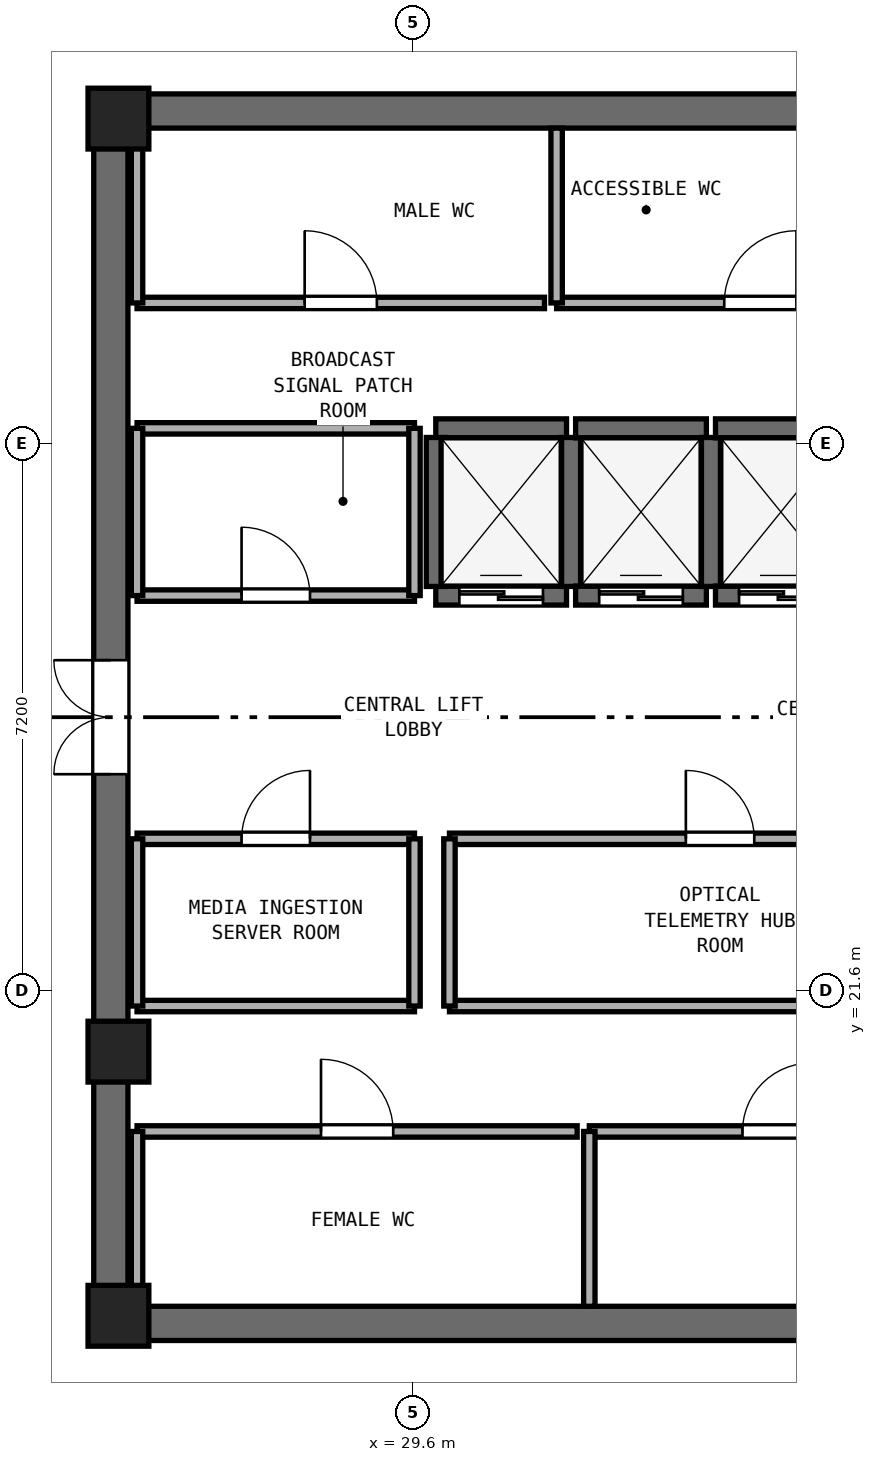
"""IFC4 building model, lengths in metres.
Left out: names, types, materials, properties, quantities, classifications, styles, units other than length and angle.
Written with IfcOpenShell. Run it as: python <this file> out.ifc"""

import sys

from ifc_helpers import new_model, si_unit, direction, frame, frame_2d, origin, origin_2d, place, context, subcontext, project, spatial, rectangle, extrude, element, fill, save


model = new_model("IFC4")
c1 = context("Model", 3, precision=1e-05, world=origin(), true_north=direction((0.0, 1.0)))
c2 = subcontext(c1, "Body", "Model", "MODEL_VIEW")
j1 = project(units=[si_unit("LENGTHUNIT", "METRE"), si_unit("PLANEANGLEUNIT", "RADIAN")], contexts=[c1])
p1 = place(None, origin())
s1 = spatial("IfcSite", under=j1, at=p1, CompositionType="ELEMENT")
p2 = place(p1, origin())
s2 = spatial("IfcBuilding", under=s1, at=p2, CompositionType="ELEMENT")
p3 = place(p2, frame((0.0, 0.0, 274.4)))
s3 = spatial("IfcBuildingStorey", under=s2, at=p3, CompositionType="ELEMENT", Elevation=274.4)
for number, where, z_axis, x_axis in (
    (1, (25.4, 17.225, 0.0), (0.0, 0.0, 1.0), (1.0, 0.0, 0.0)),
    (2, (25.4, 33.175, 0.0), (0.0, 0.0, 1.0), (1.0, 0.0, 0.0)),
):
    element("IfcWall", number, at=place(p3, frame(where, z_axis=z_axis, x_axis=x_axis)), inside=s3, PredefinedType="SHEAR", context=c2, shape_type="SweptSolid", body=[
        extrude(rectangle(XDim=23.2, YDim=0.45, at=frame_2d((11.6, 0.0))), origin(), (0.0, 0.0, 1.0), 3.54),
    ])
p4 = place(p3, frame((25.625, 17.45, 0.0), z_axis=(0.0, 0.0, 1.0), x_axis=(0.0, 1.0, 0.0)))
e3 = element("IfcWall", 3, at=p4, inside=s3, PredefinedType="SHEAR", context=c2, shape_type="SweptSolid", body=[
    extrude(rectangle(XDim=15.5, YDim=0.45, at=frame_2d((7.75, 0.0))), origin(), (0.0, 0.0, 1.0), 3.54),
])
p5 = place(p4, frame((7.0, 0.0, 0.0)))
e4 = element("IfcOpeningElement", 4, at=p5, cuts=e3, PredefinedType="OPENING", context=c2, shape_type="SweptSolid", body=[
    extrude(rectangle(XDim=1.5, YDim=2.15, at=frame_2d((0.75, 1.075))), frame((0.0, 0.235, 0.0), z_axis=(0.0, -1.0, 0.0), x_axis=(1.0, 0.0, 0.0)), (0.0, 0.0, 1.0), 0.47),
])
for number, where, z_axis, x_axis in (
    (5, (25.725, 17.325, 0.0), (0.0, 0.0, 1.0), (1.0, 0.0, 0.0)),
    (6, (25.725, 33.075, 0.0), (0.0, 0.0, 1.0), (1.0, 0.0, 0.0)),
    (7, (25.725, 20.8, 0.0), (0.0, 0.0, 1.0), (1.0, 0.0, 0.0)),
):
    element("IfcColumn", number, at=place(p3, frame(where, z_axis=z_axis, x_axis=x_axis)), inside=s3, PredefinedType="PILASTER", context=c2, shape_type="SweptSolid", body=[
        extrude(rectangle(XDim=0.8, YDim=0.8, at=origin_2d()), origin(), (0.0, 0.0, 1.0), 3.8),
    ])
p6 = place(p3, frame((29.9, 26.8, 0.0), z_axis=(0.0, 0.0, 1.0), x_axis=(1.0, 0.0, 0.0)))
e8 = element("IfcWall", 8, at=p6, inside=s3, PredefinedType="SHEAR", context=c2, shape_type="SweptSolid", body=[
    extrude(rectangle(XDim=1.72, YDim=0.25, at=frame_2d((0.86, 0.0))), origin(), (0.0, 0.0, 1.0), 3.54),
])
p7 = place(p6, frame((0.31, 0.0, 0.0)))
e9 = element("IfcOpeningElement", 9, at=p7, cuts=e8, PredefinedType="OPENING", context=c2, shape_type="SweptSolid", body=[
    extrude(rectangle(XDim=1.1, YDim=2.15, at=frame_2d((0.55, 1.075))), frame((0.0, 0.135, 0.0), z_axis=(0.0, -1.0, 0.0), x_axis=(1.0, 0.0, 0.0)), (0.0, 0.0, 1.0), 0.27),
])
p8 = place(p3, frame((29.9, 29.0, 0.0), z_axis=(0.0, 0.0, 1.0), x_axis=(1.0, 0.0, 0.0)))
e10 = element("IfcWall", 10, at=p8, inside=s3, PredefinedType="SHEAR", context=c2, shape_type="SweptSolid", body=[
    extrude(rectangle(XDim=1.72, YDim=0.25, at=frame_2d((0.86, 0.0))), origin(), (0.0, 0.0, 1.0), 3.54),
])
for number, where, z_axis, x_axis in (
    (11, (29.9, 26.92, 0.0), (0.0, 0.0, 1.0), (0.0, 1.0, 0.0)),
    (12, (31.68, 26.92, 0.0), (0.0, 0.0, 1.0), (0.0, 1.0, 0.0)),
):
    element("IfcWall", number, at=place(p3, frame(where, z_axis=z_axis, x_axis=x_axis)), inside=s3, PredefinedType="SHEAR", context=c2, shape_type="SweptSolid", body=[
        extrude(rectangle(XDim=1.96, YDim=0.25, at=frame_2d((0.98, 0.0))), origin(), (0.0, 0.0, 1.0), 3.54),
    ])
p9 = place(p3, frame((31.74, 26.8, 0.0), z_axis=(0.0, 0.0, 1.0), x_axis=(1.0, 0.0, 0.0)))
e13 = element("IfcWall", 13, at=p9, inside=s3, PredefinedType="SHEAR", context=c2, shape_type="SweptSolid", body=[
    extrude(rectangle(XDim=1.72, YDim=0.25, at=frame_2d((0.86, 0.0))), origin(), (0.0, 0.0, 1.0), 3.54),
])
p10 = place(p9, frame((0.31, 0.0, 0.0)))
e14 = element("IfcOpeningElement", 14, at=p10, cuts=e13, PredefinedType="OPENING", context=c2, shape_type="SweptSolid", body=[
    extrude(rectangle(XDim=1.1, YDim=2.15, at=frame_2d((0.55, 1.075))), frame((0.0, 0.135, 0.0), z_axis=(0.0, -1.0, 0.0), x_axis=(1.0, 0.0, 0.0)), (0.0, 0.0, 1.0), 0.27),
])
p11 = place(p3, frame((31.74, 29.0, 0.0), z_axis=(0.0, 0.0, 1.0), x_axis=(1.0, 0.0, 0.0)))
e15 = element("IfcWall", 15, at=p11, inside=s3, PredefinedType="SHEAR", context=c2, shape_type="SweptSolid", body=[
    extrude(rectangle(XDim=1.72, YDim=0.25, at=frame_2d((0.86, 0.0))), origin(), (0.0, 0.0, 1.0), 3.54),
])
p12 = place(p3, frame((33.52, 26.92, 0.0), z_axis=(0.0, 0.0, 1.0), x_axis=(0.0, 1.0, 0.0)))
e16 = element("IfcWall", 16, at=p12, inside=s3, PredefinedType="SHEAR", context=c2, shape_type="SweptSolid", body=[
    extrude(rectangle(XDim=1.96, YDim=0.25, at=frame_2d((0.98, 0.0))), origin(), (0.0, 0.0, 1.0), 3.54),
])
p13 = place(p3, frame((33.58, 26.8, 0.0), z_axis=(0.0, 0.0, 1.0), x_axis=(1.0, 0.0, 0.0)))
e17 = element("IfcWall", 17, at=p13, inside=s3, PredefinedType="SHEAR", context=c2, shape_type="SweptSolid", body=[
    extrude(rectangle(XDim=1.72, YDim=0.25, at=frame_2d((0.86, 0.0))), origin(), (0.0, 0.0, 1.0), 3.54),
])
p14 = place(p13, frame((0.31, 0.0, 0.0)))
e18 = element("IfcOpeningElement", 18, at=p14, cuts=e17, PredefinedType="OPENING", context=c2, shape_type="SweptSolid", body=[
    extrude(rectangle(XDim=1.1, YDim=2.15, at=frame_2d((0.55, 1.075))), frame((0.0, 0.135, 0.0), z_axis=(0.0, -1.0, 0.0), x_axis=(1.0, 0.0, 0.0)), (0.0, 0.0, 1.0), 0.27),
])
p15 = place(p3, frame((33.58, 29.0, 0.0), z_axis=(0.0, 0.0, 1.0), x_axis=(1.0, 0.0, 0.0)))
e19 = element("IfcWall", 19, at=p15, inside=s3, PredefinedType="SHEAR", context=c2, shape_type="SweptSolid", body=[
    extrude(rectangle(XDim=1.72, YDim=0.25, at=frame_2d((0.86, 0.0))), origin(), (0.0, 0.0, 1.0), 3.54),
])
p16 = place(p3, frame((25.97, 30.65, 0.0), z_axis=(0.0, 0.0, 1.0), x_axis=(1.0, 0.0, 0.0)))
e20 = element("IfcWall", 20, at=p16, inside=s3, PredefinedType="PARTITIONING", context=c2, shape_type="SweptSolid", body=[
    extrude(rectangle(XDim=5.36, YDim=0.15, at=frame_2d((2.68, 0.0))), origin(), (0.0, 0.0, 1.0), 3.54),
])
p17 = place(p16, frame((2.205, 0.0, 0.0)))
e21 = element("IfcOpeningElement", 21, at=p17, cuts=e20, PredefinedType="OPENING", context=c2, shape_type="SweptSolid", body=[
    extrude(rectangle(XDim=0.95, YDim=2.1, at=frame_2d((0.475, 1.05))), frame((0.0, 0.085, 0.0), z_axis=(0.0, -1.0, 0.0), x_axis=(1.0, 0.0, 0.0)), (0.0, 0.0, 1.0), 0.17),
])
p18 = place(p3, frame((25.97, 30.65, 0.0), z_axis=(0.0, 0.0, 1.0), x_axis=(0.0, 1.0, 0.0)))
e22 = element("IfcWall", 22, at=p18, inside=s3, PredefinedType="PARTITIONING", context=c2, shape_type="SweptSolid", body=[
    extrude(rectangle(XDim=2.3, YDim=0.15, at=frame_2d((1.15, 0.0))), origin(), (0.0, 0.0, 1.0), 2.64),
])
p19 = place(p3, frame((31.49, 30.65, 0.0), z_axis=(0.0, 0.0, 1.0), x_axis=(1.0, 0.0, 0.0)))
e23 = element("IfcWall", 23, at=p19, inside=s3, PredefinedType="PARTITIONING", context=c2, shape_type="SweptSolid", body=[
    extrude(rectangle(XDim=5.36, YDim=0.15, at=frame_2d((2.68, 0.0))), origin(), (0.0, 0.0, 1.0), 3.54),
])
p20 = place(p19, frame((2.205, 0.0, 0.0)))
e24 = element("IfcOpeningElement", 24, at=p20, cuts=e23, PredefinedType="OPENING", context=c2, shape_type="SweptSolid", body=[
    extrude(rectangle(XDim=0.95, YDim=2.1, at=frame_2d((0.475, 1.05))), frame((0.0, 0.085, 0.0), z_axis=(0.0, -1.0, 0.0), x_axis=(1.0, 0.0, 0.0)), (0.0, 0.0, 1.0), 0.17),
])
p21 = place(p3, frame((31.49, 30.65, 0.0), z_axis=(0.0, 0.0, 1.0), x_axis=(0.0, 1.0, 0.0)))
e25 = element("IfcWall", 25, at=p21, inside=s3, PredefinedType="PARTITIONING", context=c2, shape_type="SweptSolid", body=[
    extrude(rectangle(XDim=2.3, YDim=0.15, at=frame_2d((1.15, 0.0))), origin(), (0.0, 0.0, 1.0), 3.54),
])
p22 = place(p3, frame((25.97, 19.75, 0.0), z_axis=(0.0, 0.0, 1.0), x_axis=(1.0, 0.0, 0.0)))
e26 = element("IfcWall", 26, at=p22, inside=s3, PredefinedType="PARTITIONING", context=c2, shape_type="SweptSolid", body=[
    extrude(rectangle(XDim=5.79, YDim=0.15, at=frame_2d((2.895, 0.0))), origin(), (0.0, 0.0, 1.0), 3.54),
])
p23 = place(p22, frame((2.42, 0.0, 0.0)))
e27 = element("IfcOpeningElement", 27, at=p23, cuts=e26, PredefinedType="OPENING", context=c2, shape_type="SweptSolid", body=[
    extrude(rectangle(XDim=0.95, YDim=2.1, at=frame_2d((0.475, 1.05))), frame((0.0, 0.085, 0.0), z_axis=(0.0, -1.0, 0.0), x_axis=(1.0, 0.0, 0.0)), (0.0, 0.0, 1.0), 0.17),
])
p24 = place(p3, frame((25.97, 17.45, 0.0), z_axis=(0.0, 0.0, 1.0), x_axis=(0.0, 1.0, 0.0)))
e28 = element("IfcWall", 28, at=p24, inside=s3, PredefinedType="PARTITIONING", context=c2, shape_type="SweptSolid", body=[
    extrude(rectangle(XDim=2.3, YDim=0.15, at=frame_2d((1.15, 0.0))), origin(), (0.0, 0.0, 1.0), 2.64),
])
p25 = place(p3, frame((31.92, 19.75, 0.0), z_axis=(0.0, 0.0, 1.0), x_axis=(1.0, 0.0, 0.0)))
e29 = element("IfcWall", 29, at=p25, inside=s3, PredefinedType="PARTITIONING", context=c2, shape_type="SweptSolid", body=[
    extrude(rectangle(XDim=4.93, YDim=0.15, at=frame_2d((2.465, 0.0))), origin(), (0.0, 0.0, 1.0), 3.54),
])
p26 = place(p25, frame((2.015, 0.0, 0.0)))
e30 = element("IfcOpeningElement", 30, at=p26, cuts=e29, PredefinedType="OPENING", context=c2, shape_type="SweptSolid", body=[
    extrude(rectangle(XDim=0.9, YDim=2.1, at=frame_2d((0.45, 1.05))), frame((0.0, 0.085, 0.0), z_axis=(0.0, -1.0, 0.0), x_axis=(1.0, 0.0, 0.0)), (0.0, 0.0, 1.0), 0.17),
])
p27 = place(p3, frame((31.92, 17.45, 0.0), z_axis=(0.0, 0.0, 1.0), x_axis=(0.0, 1.0, 0.0)))
e31 = element("IfcWall", 31, at=p27, inside=s3, PredefinedType="PARTITIONING", context=c2, shape_type="SweptSolid", body=[
    extrude(rectangle(XDim=2.3, YDim=0.15, at=frame_2d((1.15, 0.0))), origin(), (0.0, 0.0, 1.0), 3.54),
])
p28 = place(p3, frame((25.97, 26.8, 0.0), z_axis=(0.0, 0.0, 1.0), x_axis=(1.0, 0.0, 0.0)))
e32 = element("IfcWall", 32, at=p28, inside=s3, PredefinedType="PARTITIONING", context=c2, shape_type="SweptSolid", body=[
    extrude(rectangle(XDim=3.65, YDim=0.15, at=frame_2d((1.825, 0.0))), origin(), (0.0, 0.0, 1.0), 3.54),
])
p29 = place(p28, frame((1.375, 0.0, 0.0)))
e33 = element("IfcOpeningElement", 33, at=p29, cuts=e32, PredefinedType="OPENING", context=c2, shape_type="SweptSolid", body=[
    extrude(rectangle(XDim=0.9, YDim=2.1, at=frame_2d((0.45, 1.05))), frame((0.0, 0.085, 0.0), z_axis=(0.0, -1.0, 0.0), x_axis=(1.0, 0.0, 0.0)), (0.0, 0.0, 1.0), 0.17),
])
p30 = place(p3, frame((25.97, 29.0, 0.0), z_axis=(0.0, 0.0, 1.0), x_axis=(1.0, 0.0, 0.0)))
e34 = element("IfcWall", 34, at=p30, inside=s3, PredefinedType="PARTITIONING", context=c2, shape_type="SweptSolid", body=[
    extrude(rectangle(XDim=3.65, YDim=0.15, at=frame_2d((1.825, 0.0))), origin(), (0.0, 0.0, 1.0), 3.54),
])
p31 = place(p3, frame((25.97, 26.8, 0.0), z_axis=(0.0, 0.0, 1.0), x_axis=(0.0, 1.0, 0.0)))
e35 = element("IfcWall", 35, at=p31, inside=s3, PredefinedType="PARTITIONING", context=c2, shape_type="SweptSolid", body=[
    extrude(rectangle(XDim=2.2, YDim=0.15, at=frame_2d((1.1, 0.0))), origin(), (0.0, 0.0, 1.0), 2.64),
])
p32 = place(p3, frame((29.62, 26.8, 0.0), z_axis=(0.0, 0.0, 1.0), x_axis=(0.0, 1.0, 0.0)))
e36 = element("IfcWall", 36, at=p32, inside=s3, PredefinedType="PARTITIONING", context=c2, shape_type="SweptSolid", body=[
    extrude(rectangle(XDim=2.2, YDim=0.15, at=frame_2d((1.1, 0.0))), origin(), (0.0, 0.0, 1.0), 3.54),
])
p33 = place(p3, frame((25.97, 21.4, 0.0), z_axis=(0.0, 0.0, 1.0), x_axis=(1.0, 0.0, 0.0)))
e37 = element("IfcWall", 37, at=p33, inside=s3, PredefinedType="PARTITIONING", context=c2, shape_type="SweptSolid", body=[
    extrude(rectangle(XDim=3.65, YDim=0.15, at=frame_2d((1.825, 0.0))), origin(), (0.0, 0.0, 1.0), 3.54),
])
p34 = place(p3, frame((25.97, 23.6, 0.0), z_axis=(0.0, 0.0, 1.0), x_axis=(1.0, 0.0, 0.0)))
e38 = element("IfcWall", 38, at=p34, inside=s3, PredefinedType="PARTITIONING", context=c2, shape_type="SweptSolid", body=[
    extrude(rectangle(XDim=3.65, YDim=0.15, at=frame_2d((1.825, 0.0))), origin(), (0.0, 0.0, 1.0), 3.54),
])
p35 = place(p34, frame((1.375, 0.0, 0.0)))
e39 = element("IfcOpeningElement", 39, at=p35, cuts=e38, PredefinedType="OPENING", context=c2, shape_type="SweptSolid", body=[
    extrude(rectangle(XDim=0.9, YDim=2.1, at=frame_2d((0.45, 1.05))), frame((0.0, 0.085, 0.0), z_axis=(0.0, -1.0, 0.0), x_axis=(1.0, 0.0, 0.0)), (0.0, 0.0, 1.0), 0.17),
])
p36 = place(p3, frame((25.97, 21.4, 0.0), z_axis=(0.0, 0.0, 1.0), x_axis=(0.0, 1.0, 0.0)))
e40 = element("IfcWall", 40, at=p36, inside=s3, PredefinedType="PARTITIONING", context=c2, shape_type="SweptSolid", body=[
    extrude(rectangle(XDim=2.2, YDim=0.15, at=frame_2d((1.1, 0.0))), origin(), (0.0, 0.0, 1.0), 2.64),
])
p37 = place(p3, frame((29.62, 21.4, 0.0), z_axis=(0.0, 0.0, 1.0), x_axis=(0.0, 1.0, 0.0)))
e41 = element("IfcWall", 41, at=p37, inside=s3, PredefinedType="PARTITIONING", context=c2, shape_type="SweptSolid", body=[
    extrude(rectangle(XDim=2.2, YDim=0.15, at=frame_2d((1.1, 0.0))), origin(), (0.0, 0.0, 1.0), 3.54),
])
p38 = place(p3, frame((30.08, 21.4, 0.0), z_axis=(0.0, 0.0, 1.0), x_axis=(1.0, 0.0, 0.0)))
e42 = element("IfcWall", 42, at=p38, inside=s3, PredefinedType="PARTITIONING", context=c2, shape_type="SweptSolid", body=[
    extrude(rectangle(XDim=7.12, YDim=0.15, at=frame_2d((3.56, 0.0))), origin(), (0.0, 0.0, 1.0), 3.54),
])
p39 = place(p3, frame((30.08, 23.6, 0.0), z_axis=(0.0, 0.0, 1.0), x_axis=(1.0, 0.0, 0.0)))
e43 = element("IfcWall", 43, at=p39, inside=s3, PredefinedType="PARTITIONING", context=c2, shape_type="SweptSolid", body=[
    extrude(rectangle(XDim=7.12, YDim=0.15, at=frame_2d((3.56, 0.0))), origin(), (0.0, 0.0, 1.0), 3.54),
])
p40 = place(p39, frame((3.11, 0.0, 0.0)))
e44 = element("IfcOpeningElement", 44, at=p40, cuts=e43, PredefinedType="OPENING", context=c2, shape_type="SweptSolid", body=[
    extrude(rectangle(XDim=0.9, YDim=2.1, at=frame_2d((0.45, 1.05))), frame((0.0, 0.085, 0.0), z_axis=(0.0, -1.0, 0.0), x_axis=(1.0, 0.0, 0.0)), (0.0, 0.0, 1.0), 0.17),
])
p41 = place(p3, frame((30.08, 21.4, 0.0), z_axis=(0.0, 0.0, 1.0), x_axis=(0.0, 1.0, 0.0)))
e45 = element("IfcWall", 45, at=p41, inside=s3, PredefinedType="PARTITIONING", context=c2, shape_type="SweptSolid", body=[
    extrude(rectangle(XDim=2.2, YDim=0.15, at=frame_2d((1.1, 0.0))), origin(), (0.0, 0.0, 1.0), 3.54),
])
p42 = place(p7, origin())
e46 = element("IfcDoor", 46, at=p42, inside=s3, OperationType="DOUBLE_DOOR_SLIDING", PredefinedType="DOOR", context=c2, shape_type="SweptSolid", body=[
    extrude(rectangle(XDim=1.1, YDim=2.15, at=frame_2d((0.55, 1.075))), frame((0.0, 0.025, 0.0), z_axis=(0.0, -1.0, 0.0), x_axis=(1.0, 0.0, 0.0)), (0.0, 0.0, 1.0), 0.05),
])
fill(e9, e46)
p43 = place(p10, origin())
e47 = element("IfcDoor", 47, at=p43, inside=s3, OperationType="DOUBLE_DOOR_SLIDING", PredefinedType="DOOR", context=c2, shape_type="SweptSolid", body=[
    extrude(rectangle(XDim=1.1, YDim=2.15, at=frame_2d((0.55, 1.075))), frame((0.0, 0.025, 0.0), z_axis=(0.0, -1.0, 0.0), x_axis=(1.0, 0.0, 0.0)), (0.0, 0.0, 1.0), 0.05),
])
fill(e14, e47)
p44 = place(p14, origin())
e48 = element("IfcDoor", 48, at=p44, inside=s3, OperationType="DOUBLE_DOOR_SLIDING", PredefinedType="DOOR", context=c2, shape_type="SweptSolid", body=[
    extrude(rectangle(XDim=1.1, YDim=2.15, at=frame_2d((0.55, 1.075))), frame((0.0, 0.025, 0.0), z_axis=(0.0, -1.0, 0.0), x_axis=(1.0, 0.0, 0.0)), (0.0, 0.0, 1.0), 0.05),
])
fill(e18, e48)
p45 = place(p5, origin())
e49 = element("IfcDoor", 49, at=p45, inside=s3, OperationType="DOUBLE_DOOR_SINGLE_SWING", PredefinedType="DOOR", context=c2, shape_type="SweptSolid", body=[
    extrude(rectangle(XDim=1.5, YDim=2.15, at=frame_2d((0.75, 1.075))), frame((0.0, 0.025, 0.0), z_axis=(0.0, -1.0, 0.0), x_axis=(1.0, 0.0, 0.0)), (0.0, 0.0, 1.0), 0.05),
])
fill(e4, e49)
p46 = place(p17, origin())
e50 = element("IfcDoor", 50, at=p46, inside=s3, OperationType="SINGLE_SWING_LEFT", PredefinedType="DOOR", context=c2, shape_type="SweptSolid", body=[
    extrude(rectangle(XDim=0.95, YDim=2.1, at=frame_2d((0.475, 1.05))), frame((0.0, 0.025, 0.0), z_axis=(0.0, -1.0, 0.0), x_axis=(1.0, 0.0, 0.0)), (0.0, 0.0, 1.0), 0.05),
])
fill(e21, e50)
p47 = place(p20, origin())
e51 = element("IfcDoor", 51, at=p47, inside=s3, OperationType="SINGLE_SWING_RIGHT", PredefinedType="DOOR", context=c2, shape_type="SweptSolid", body=[
    extrude(rectangle(XDim=0.95, YDim=2.1, at=frame_2d((0.475, 1.05))), frame((0.0, 0.025, 0.0), z_axis=(0.0, -1.0, 0.0), x_axis=(1.0, 0.0, 0.0)), (0.0, 0.0, 1.0), 0.05),
])
fill(e24, e51)
p48 = place(p23, origin())
e52 = element("IfcDoor", 52, at=p48, inside=s3, OperationType="SINGLE_SWING_LEFT", PredefinedType="DOOR", context=c2, shape_type="SweptSolid", body=[
    extrude(rectangle(XDim=0.95, YDim=2.1, at=frame_2d((0.475, 1.05))), frame((0.0, 0.025, 0.0), z_axis=(0.0, -1.0, 0.0), x_axis=(1.0, 0.0, 0.0)), (0.0, 0.0, 1.0), 0.05),
])
fill(e27, e52)
p49 = place(p26, origin())
e53 = element("IfcDoor", 53, at=p49, inside=s3, OperationType="SINGLE_SWING_RIGHT", PredefinedType="DOOR", context=c2, shape_type="SweptSolid", body=[
    extrude(rectangle(XDim=0.9, YDim=2.1, at=frame_2d((0.45, 1.05))), frame((0.0, 0.025, 0.0), z_axis=(0.0, -1.0, 0.0), x_axis=(1.0, 0.0, 0.0)), (0.0, 0.0, 1.0), 0.05),
])
fill(e30, e53)
p50 = place(p29, origin())
e54 = element("IfcDoor", 54, at=p50, inside=s3, OperationType="SINGLE_SWING_LEFT", PredefinedType="DOOR", context=c2, shape_type="SweptSolid", body=[
    extrude(rectangle(XDim=0.9, YDim=2.1, at=frame_2d((0.45, 1.05))), frame((0.0, 0.025, 0.0), z_axis=(0.0, -1.0, 0.0), x_axis=(1.0, 0.0, 0.0)), (0.0, 0.0, 1.0), 0.05),
])
fill(e33, e54)
p51 = place(p35, origin())
e55 = element("IfcDoor", 55, at=p51, inside=s3, OperationType="SINGLE_SWING_RIGHT", PredefinedType="DOOR", context=c2, shape_type="SweptSolid", body=[
    extrude(rectangle(XDim=0.9, YDim=2.1, at=frame_2d((0.45, 1.05))), frame((0.0, 0.025, 0.0), z_axis=(0.0, -1.0, 0.0), x_axis=(1.0, 0.0, 0.0)), (0.0, 0.0, 1.0), 0.05),
])
fill(e39, e55)
p52 = place(p40, origin())
e56 = element("IfcDoor", 56, at=p52, inside=s3, OperationType="SINGLE_SWING_LEFT", PredefinedType="DOOR", context=c2, shape_type="SweptSolid", body=[
    extrude(rectangle(XDim=0.9, YDim=2.1, at=frame_2d((0.45, 1.05))), frame((0.0, 0.025, 0.0), z_axis=(0.0, -1.0, 0.0), x_axis=(1.0, 0.0, 0.0)), (0.0, 0.0, 1.0), 0.05),
])
fill(e44, e56)
save(model, sys.argv[1])
